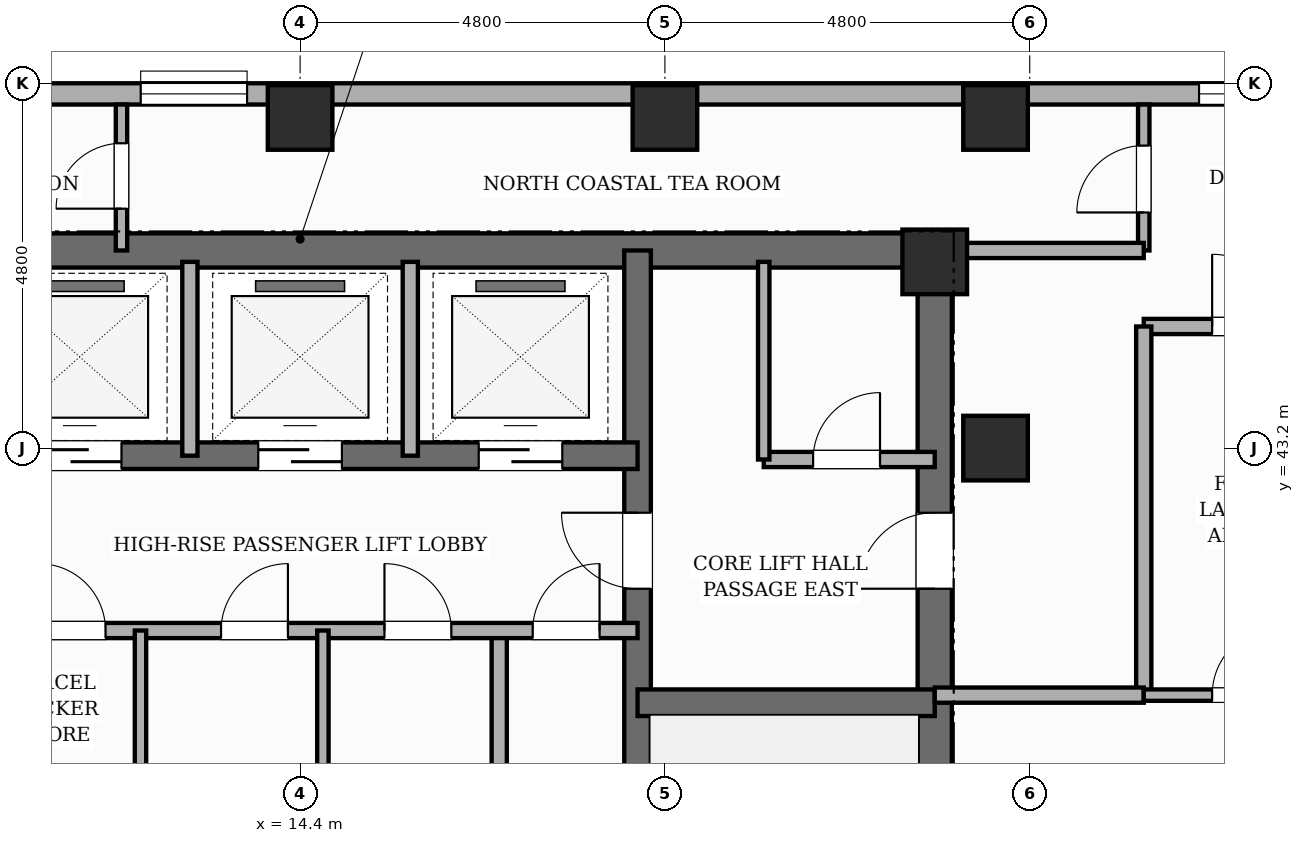
"""IFC4 building model, lengths in metres.
Left out: names, types, materials, properties, quantities, classifications, styles, units other than length and angle.
Written with IfcOpenShell. Run it as: python <this file> out.ifc"""

import sys

from ifc_helpers import new_model, si_unit, direction, frame, frame_2d, origin, origin_2d, place, context, subcontext, project, spatial, rectangle, extrude, element, fill, save


model = new_model("IFC4")
c1 = context("Model", 3, precision=1e-05, world=origin(), true_north=direction((0.0, 1.0)))
c2 = subcontext(c1, "Body", "Model", "MODEL_VIEW")
j1 = project(units=[si_unit("LENGTHUNIT", "METRE"), si_unit("PLANEANGLEUNIT", "RADIAN")], contexts=[c1])
p1 = place(None, origin())
s1 = spatial("IfcSite", under=j1, at=p1, CompositionType="ELEMENT")
p2 = place(p1, origin())
s2 = spatial("IfcBuilding", under=s1, at=p2, CompositionType="ELEMENT")
p3 = place(p2, frame((0.0, 0.0, 236.2)))
s3 = spatial("IfcBuildingStorey", under=s2, at=p3, CompositionType="ELEMENT", Elevation=236.2)
p4 = place(p3, frame((22.75, 30.675, 0.0), z_axis=(0.0, 0.0, 1.0), x_axis=(0.0, 1.0, 0.0)))
e1 = element("IfcWall", 1, at=p4, inside=s3, PredefinedType="SHEAR", context=c2, shape_type="SweptSolid", body=[
    extrude(rectangle(XDim=15.35, YDim=0.45, at=frame_2d((7.675, 0.0))), origin(), (0.0, 0.0, 1.0), 3.6),
])
p5 = place(p4, frame((10.675, 0.0, 0.0)))
e2 = element("IfcOpeningElement", 2, at=p5, cuts=e1, PredefinedType="OPENING", context=c2, shape_type="SweptSolid", body=[
    extrude(rectangle(XDim=1.0, YDim=2.15, at=frame_2d((0.5, 1.075))), frame((0.0, 0.235, 0.0), z_axis=(0.0, -1.0, 0.0), x_axis=(1.0, 0.0, 0.0)), (0.0, 0.0, 1.0), 0.47),
])
p6 = place(p3, frame((6.05, 45.8, 0.0), z_axis=(0.0, 0.0, 1.0), x_axis=(1.0, 0.0, 0.0)))
e3 = element("IfcWall", 3, at=p6, inside=s3, PredefinedType="SHEAR", context=c2, shape_type="SweptSolid", body=[
    extrude(rectangle(XDim=16.7, YDim=0.45, at=frame_2d((8.35, 0.0))), origin(), (0.0, 0.0, 1.0), 3.6),
])
p7 = place(p3, frame((18.84, 30.9, 0.0), z_axis=(0.0, 0.0, 1.0), x_axis=(0.0, 1.0, 0.0)))
e4 = element("IfcWall", 4, at=p7, inside=s3, PredefinedType="SHEAR", context=c2, shape_type="SweptSolid", body=[
    extrude(rectangle(XDim=14.9, YDim=0.35, at=frame_2d((7.45, 0.0))), origin(), (0.0, 0.0, 1.0), 3.6),
])
p8 = place(p7, frame((0.65, 0.0, 0.0)))
e5 = element("IfcOpeningElement", 5, at=p8, cuts=e4, PredefinedType="OPENING", context=c2, shape_type="SweptSolid", body=[
    extrude(rectangle(XDim=0.95, YDim=2.1, at=frame_2d((0.475, 1.05))), frame((0.0, 0.185, 0.0), z_axis=(0.0, -1.0, 0.0), x_axis=(1.0, 0.0, 0.0)), (0.0, 0.0, 1.0), 0.37),
])
p9 = place(p7, frame((10.45, 0.0, 0.0)))
e6 = element("IfcOpeningElement", 6, at=p9, cuts=e4, PredefinedType="OPENING", context=c2, shape_type="SweptSolid", body=[
    extrude(rectangle(XDim=1.0, YDim=2.15, at=frame_2d((0.5, 1.075))), frame((0.0, 0.185, 0.0), z_axis=(0.0, -1.0, 0.0), x_axis=(1.0, 0.0, 0.0)), (0.0, 0.0, 1.0), 0.37),
])
p10 = place(p3, frame((18.84, 39.85, 0.0), z_axis=(0.0, 0.0, 1.0), x_axis=(1.0, 0.0, 0.0)))
e7 = element("IfcWall", 7, at=p10, inside=s3, PredefinedType="SHEAR", context=c2, shape_type="SweptSolid", body=[
    extrude(rectangle(XDim=3.91, YDim=0.35, at=frame_2d((1.955, 0.0))), origin(), (0.0, 0.0, 1.0), 3.6),
])
p11 = place(p3, frame((9.96, 43.1, 0.0), z_axis=(0.0, 0.0, 1.0), x_axis=(1.0, 0.0, 0.0)))
e8 = element("IfcWall", 8, at=p11, inside=s3, PredefinedType="SHEAR", context=c2, shape_type="SweptSolid", body=[
    extrude(rectangle(XDim=8.88, YDim=0.35, at=frame_2d((4.44, 0.0))), origin(), (0.0, 0.0, 1.0), 3.6),
])
p12 = place(p11, frame((0.99, 0.0, 0.0)))
e9 = element("IfcOpeningElement", 9, at=p12, cuts=e8, PredefinedType="OPENING", context=c2, shape_type="SweptSolid", body=[
    extrude(rectangle(XDim=1.1, YDim=2.15, at=frame_2d((0.55, 1.075))), frame((0.0, 0.185, 0.0), z_axis=(0.0, -1.0, 0.0), x_axis=(1.0, 0.0, 0.0)), (0.0, 0.0, 1.0), 0.37),
])
p13 = place(p11, frame((3.89, 0.0, 0.0)))
e10 = element("IfcOpeningElement", 10, at=p13, cuts=e8, PredefinedType="OPENING", context=c2, shape_type="SweptSolid", body=[
    extrude(rectangle(XDim=1.1, YDim=2.15, at=frame_2d((0.55, 1.075))), frame((0.0, 0.185, 0.0), z_axis=(0.0, -1.0, 0.0), x_axis=(1.0, 0.0, 0.0)), (0.0, 0.0, 1.0), 0.37),
])
p14 = place(p11, frame((6.79, 0.0, 0.0)))
e11 = element("IfcOpeningElement", 11, at=p14, cuts=e8, PredefinedType="OPENING", context=c2, shape_type="SweptSolid", body=[
    extrude(rectangle(XDim=1.1, YDim=2.15, at=frame_2d((0.55, 1.075))), frame((0.0, 0.185, 0.0), z_axis=(0.0, -1.0, 0.0), x_axis=(1.0, 0.0, 0.0)), (0.0, 0.0, 1.0), 0.37),
])
for number, where, z_axis, x_axis in (
    (12, (14.4, 47.55, 0.0), (0.0, 0.0, 1.0), (1.0, 0.0, 0.0)),
    (13, (19.2, 47.55, 0.0), (0.0, 0.0, 1.0), (1.0, 0.0, 0.0)),
    (14, (22.75, 45.65, 0.0), (0.0, 0.0, 1.0), (1.0, 0.0, 0.0)),
    (15, (23.55, 43.2, 0.0), (0.0, 0.0, 1.0), (1.0, 0.0, 0.0)),
    (16, (23.55, 47.55, 0.0), (0.0, 0.0, 1.0), (1.0, 0.0, 0.0)),
):
    element("IfcColumn", number, at=place(p3, frame(where, z_axis=z_axis, x_axis=x_axis)), inside=s3, PredefinedType="COLUMN", context=c2, shape_type="SweptSolid", body=[
        extrude(rectangle(XDim=0.85, YDim=0.85, at=origin_2d()), origin(), (0.0, 0.0, 1.0), 3.6),
    ])
p15 = place(p3, frame((7.2, 47.86, 0.0), z_axis=(0.0, 0.0, 1.0), x_axis=(1.0, 0.0, 0.0)))
e17 = element("IfcWall", 17, at=p15, inside=s3, PredefinedType="STANDARD", context=c2, shape_type="SweptSolid", body=[
    extrude(rectangle(XDim=43.2, YDim=0.28, at=frame_2d((21.6, 0.0))), origin(), (0.0, 0.0, 1.0), 2.6),
])
p16 = place(p15, frame((19.028, 0.0, 0.65)))
e18 = element("IfcOpeningElement", 18, at=p16, cuts=e17, PredefinedType="OPENING", context=c2, shape_type="SweptSolid", body=[
    extrude(rectangle(XDim=1.4, YDim=1.1, at=frame_2d((0.7, 0.55))), frame((0.0, 0.15, 0.0), z_axis=(0.0, -1.0, 0.0), x_axis=(1.0, 0.0, 0.0)), (0.0, 0.0, 1.0), 0.3),
])
p17 = place(p15, frame((0.308, 0.0, 0.65)))
e19 = element("IfcOpeningElement", 19, at=p17, cuts=e17, PredefinedType="OPENING", context=c2, shape_type="SweptSolid", body=[
    extrude(rectangle(XDim=1.4, YDim=1.1, at=frame_2d((0.7, 0.55))), frame((0.0, 0.15, 0.0), z_axis=(0.0, -1.0, 0.0), x_axis=(1.0, 0.0, 0.0)), (0.0, 0.0, 1.0), 0.3),
])
p18 = place(p15, frame((5.103, 0.0, 0.65)))
e20 = element("IfcOpeningElement", 20, at=p18, cuts=e17, PredefinedType="OPENING", context=c2, shape_type="SweptSolid", body=[
    extrude(rectangle(XDim=1.4, YDim=1.1, at=frame_2d((0.7, 0.55))), frame((0.0, 0.15, 0.0), z_axis=(0.0, -1.0, 0.0), x_axis=(1.0, 0.0, 0.0)), (0.0, 0.0, 1.0), 0.3),
])
p19 = place(p3, frame((17.02, 35.65, 0.0), z_axis=(0.0, 0.0, 1.0), x_axis=(0.0, 1.0, 0.0)))
e21 = element("IfcWall", 21, at=p19, inside=s3, PredefinedType="POLYGONAL", context=c2, shape_type="SweptSolid", body=[
    extrude(rectangle(XDim=5.15, YDim=0.2, at=frame_2d((2.575, 0.0))), origin(), (0.0, 0.0, 1.0), 3.32),
])
p20 = place(p3, frame((9.96, 40.8, 0.0), z_axis=(0.0, 0.0, 1.0), x_axis=(1.0, 0.0, 0.0)))
e22 = element("IfcWall", 22, at=p20, inside=s3, PredefinedType="POLYGONAL", context=c2, shape_type="SweptSolid", body=[
    extrude(rectangle(XDim=8.88, YDim=0.2, at=frame_2d((4.44, 0.0))), origin(), (0.0, 0.0, 1.0), 3.32),
])
p21 = place(p20, frame((7.5, 0.0, 0.0)))
e23 = element("IfcOpeningElement", 23, at=p21, cuts=e22, PredefinedType="OPENING", context=c2, shape_type="SweptSolid", body=[
    extrude(rectangle(XDim=0.88, YDim=2.1, at=frame_2d((0.44, 1.05))), frame((0.0, 0.11, 0.0), z_axis=(0.0, -1.0, 0.0), x_axis=(1.0, 0.0, 0.0)), (0.0, 0.0, 1.0), 0.22),
])
p22 = place(p20, frame((1.0, 0.0, 0.0)))
e24 = element("IfcOpeningElement", 24, at=p22, cuts=e22, PredefinedType="OPENING", context=c2, shape_type="SweptSolid", body=[
    extrude(rectangle(XDim=0.88, YDim=2.1, at=frame_2d((0.44, 1.05))), frame((0.0, 0.11, 0.0), z_axis=(0.0, -1.0, 0.0), x_axis=(1.0, 0.0, 0.0)), (0.0, 0.0, 1.0), 0.22),
])
p23 = place(p20, frame((3.4, 0.0, 0.0)))
e25 = element("IfcOpeningElement", 25, at=p23, cuts=e22, PredefinedType="OPENING", context=c2, shape_type="SweptSolid", body=[
    extrude(rectangle(XDim=0.88, YDim=2.1, at=frame_2d((0.44, 1.05))), frame((0.0, 0.11, 0.0), z_axis=(0.0, -1.0, 0.0), x_axis=(1.0, 0.0, 0.0)), (0.0, 0.0, 1.0), 0.22),
])
p24 = place(p20, frame((5.55, 0.0, 0.0)))
e26 = element("IfcOpeningElement", 26, at=p24, cuts=e22, PredefinedType="OPENING", context=c2, shape_type="SweptSolid", body=[
    extrude(rectangle(XDim=0.88, YDim=2.1, at=frame_2d((0.44, 1.05))), frame((0.0, 0.11, 0.0), z_axis=(0.0, -1.0, 0.0), x_axis=(1.0, 0.0, 0.0)), (0.0, 0.0, 1.0), 0.22),
])
p25 = place(p3, frame((20.5, 43.05, 0.0), z_axis=(0.0, 0.0, 1.0), x_axis=(1.0, 0.0, 0.0)))
e27 = element("IfcWall", 27, at=p25, inside=s3, PredefinedType="POLYGONAL", context=c2, shape_type="SweptSolid", body=[
    extrude(rectangle(XDim=2.25, YDim=0.2, at=frame_2d((1.125, 0.0))), origin(), (0.0, 0.0, 1.0), 2.6),
])
p26 = place(p25, frame((0.65, 0.0, 0.0)))
e28 = element("IfcOpeningElement", 28, at=p26, cuts=e27, PredefinedType="OPENING", context=c2, shape_type="SweptSolid", body=[
    extrude(rectangle(XDim=0.88, YDim=2.1, at=frame_2d((0.44, 1.05))), frame((0.0, 0.11, 0.0), z_axis=(0.0, -1.0, 0.0), x_axis=(1.0, 0.0, 0.0)), (0.0, 0.0, 1.0), 0.22),
])
for number, where, z_axis, x_axis in (
    (29, (12.95, 43.1, 0.0), (0.0, 0.0, 1.0), (0.0, 1.0, 0.0)),
    (30, (15.85, 43.1, 0.0), (0.0, 0.0, 1.0), (0.0, 1.0, 0.0)),
):
    element("IfcWall", number, at=place(p3, frame(where, z_axis=z_axis, x_axis=x_axis)), inside=s3, PredefinedType="POLYGONAL", context=c2, shape_type="SweptSolid", body=[
        extrude(rectangle(XDim=2.55, YDim=0.2, at=frame_2d((1.275, 0.0))), origin(), (0.0, 0.0, 1.0), 3.32),
    ])
for number, where, z_axis, x_axis in (
    (31, (12.3, 38.72, 0.0), (0.0, 0.0, 1.0), (0.0, 1.0, 0.0)),
    (32, (14.7, 38.72, 0.0), (0.0, 0.0, 1.0), (0.0, 1.0, 0.0)),
):
    element("IfcWall", number, at=place(p3, frame(where, z_axis=z_axis, x_axis=x_axis)), inside=s3, PredefinedType="PARTITIONING", context=c2, shape_type="SweptSolid", body=[
        extrude(rectangle(XDim=2.08, YDim=0.15, at=frame_2d((1.04, 0.0))), origin(), (0.0, 0.0, 1.0), 3.32),
    ])
p27 = place(p3, frame((20.5, 43.05, 0.0), z_axis=(0.0, 0.0, 1.0), x_axis=(0.0, 1.0, 0.0)))
e33 = element("IfcWall", 33, at=p27, inside=s3, PredefinedType="PARTITIONING", context=c2, shape_type="SweptSolid", body=[
    extrude(rectangle(XDim=2.6, YDim=0.15, at=frame_2d((1.3, 0.0))), origin(), (0.0, 0.0, 1.0), 3.32),
])
p28 = place(p3, frame((25.5, 45.8, 0.0), z_axis=(0.0, 0.0, 1.0), x_axis=(0.0, 1.0, 0.0)))
e34 = element("IfcWall", 34, at=p28, inside=s3, PredefinedType="PARTITIONING", context=c2, shape_type="SweptSolid", body=[
    extrude(rectangle(XDim=1.92, YDim=0.15, at=frame_2d((0.96, 0.0))), origin(), (0.0, 0.0, 1.0), 3.32),
])
p29 = place(p28, frame((0.5, 0.0, 0.0)))
e35 = element("IfcOpeningElement", 35, at=p29, cuts=e34, PredefinedType="OPENING", context=c2, shape_type="SweptSolid", body=[
    extrude(rectangle(XDim=0.88, YDim=2.1, at=frame_2d((0.44, 1.05))), frame((0.0, 0.085, 0.0), z_axis=(0.0, -1.0, 0.0), x_axis=(1.0, 0.0, 0.0)), (0.0, 0.0, 1.0), 0.17),
])
p30 = place(p3, frame((22.75, 45.8, 0.0), z_axis=(0.0, 0.0, 1.0), x_axis=(1.0, 0.0, 0.0)))
e36 = element("IfcWall", 36, at=p30, inside=s3, PredefinedType="PARTITIONING", context=c2, shape_type="SweptSolid", body=[
    extrude(rectangle(XDim=2.75, YDim=0.2, at=frame_2d((1.375, 0.0))), origin(), (0.0, 0.0, 1.0), 3.32),
])
p31 = place(p3, frame((12.05, 45.8, 0.0), z_axis=(0.0, 0.0, 1.0), x_axis=(0.0, 1.0, 0.0)))
e37 = element("IfcWall", 37, at=p31, inside=s3, PredefinedType="PARTITIONING", context=c2, shape_type="SweptSolid", body=[
    extrude(rectangle(XDim=1.92, YDim=0.15, at=frame_2d((0.96, 0.0))), origin(), (0.0, 0.0, 1.0), 3.32),
])
p32 = place(p31, frame((0.55, 0.0, 0.0)))
e38 = element("IfcOpeningElement", 38, at=p32, cuts=e37, PredefinedType="OPENING", context=c2, shape_type="SweptSolid", body=[
    extrude(rectangle(XDim=0.86, YDim=2.1, at=frame_2d((0.43, 1.05))), frame((0.0, 0.085, 0.0), z_axis=(0.0, -1.0, 0.0), x_axis=(1.0, 0.0, 0.0)), (0.0, 0.0, 1.0), 0.17),
])
p33 = place(p3, frame((25.5, 44.8, 0.0), z_axis=(0.0, 0.0, 1.0), x_axis=(1.0, 0.0, 0.0)))
e39 = element("IfcWall", 39, at=p33, inside=s3, PredefinedType="PARTITIONING", context=c2, shape_type="SweptSolid", body=[
    extrude(rectangle(XDim=16.28, YDim=0.2, at=frame_2d((8.14, 0.0))), origin(), (0.0, 0.0, 1.0), 3.32),
])
p34 = place(p33, frame((0.9, 0.0, 0.0)))
e40 = element("IfcOpeningElement", 40, at=p34, cuts=e39, PredefinedType="OPENING", context=c2, shape_type="SweptSolid", body=[
    extrude(rectangle(XDim=0.95, YDim=2.15, at=frame_2d((0.475, 1.075))), frame((0.0, 0.11, 0.0), z_axis=(0.0, -1.0, 0.0), x_axis=(1.0, 0.0, 0.0)), (0.0, 0.0, 1.0), 0.22),
])
p35 = place(p33, frame((6.014, 0.0, 0.0)))
e41 = element("IfcOpeningElement", 41, at=p35, cuts=e39, PredefinedType="OPENING", context=c2, shape_type="SweptSolid", body=[
    extrude(rectangle(XDim=0.98, YDim=2.18, at=frame_2d((0.49, 1.09))), frame((0.0, 0.11, 0.0), z_axis=(0.0, -1.0, 0.0), x_axis=(1.0, 0.0, 0.0)), (0.0, 0.0, 1.0), 0.22),
])
p36 = place(p3, frame((25.5, 39.95, 0.0), z_axis=(0.0, 0.0, 1.0), x_axis=(0.0, 1.0, 0.0)))
e42 = element("IfcWall", 42, at=p36, inside=s3, PredefinedType="PARTITIONING", context=c2, shape_type="SweptSolid", body=[
    extrude(rectangle(XDim=4.85, YDim=0.2, at=frame_2d((2.425, 0.0))), origin(), (0.0, 0.0, 1.0), 3.32),
])
p37 = place(p3, frame((22.75, 39.95, 0.0), z_axis=(0.0, 0.0, 1.0), x_axis=(1.0, 0.0, 0.0)))
e43 = element("IfcWall", 43, at=p37, inside=s3, PredefinedType="PARTITIONING", context=c2, shape_type="SweptSolid", body=[
    extrude(rectangle(XDim=2.75, YDim=0.2, at=frame_2d((1.375, 0.0))), origin(), (0.0, 0.0, 1.0), 3.32),
])
p38 = place(p3, frame((25.5, 39.95, 0.0), z_axis=(0.0, 0.0, 1.0), x_axis=(1.0, 0.0, 0.0)))
e44 = element("IfcWall", 44, at=p38, inside=s3, PredefinedType="PARTITIONING", context=c2, shape_type="SweptSolid", body=[
    extrude(rectangle(XDim=2.8, YDim=0.15, at=frame_2d((1.4, 0.0))), origin(), (0.0, 0.0, 1.0), 3.32),
])
p39 = place(p38, frame((0.9, 0.0, 0.0)))
e45 = element("IfcOpeningElement", 45, at=p39, cuts=e44, PredefinedType="OPENING", context=c2, shape_type="SweptSolid", body=[
    extrude(rectangle(XDim=0.9, YDim=2.15, at=frame_2d((0.45, 1.075))), frame((0.0, 0.085, 0.0), z_axis=(0.0, -1.0, 0.0), x_axis=(1.0, 0.0, 0.0)), (0.0, 0.0, 1.0), 0.17),
])
p40 = place(p16, origin())
e46 = element("IfcWindow", 46, at=p40, inside=s3, PartitioningType="SINGLE_PANEL", PredefinedType="WINDOW", context=c2, shape_type="SweptSolid", body=[
    extrude(rectangle(XDim=1.4, YDim=1.1, at=frame_2d((0.7, 0.55))), frame((0.0, 0.03, 0.0), z_axis=(0.0, -1.0, 0.0), x_axis=(1.0, 0.0, 0.0)), (0.0, 0.0, 1.0), 0.06),
])
fill(e18, e46)
p41 = place(p18, origin())
e47 = element("IfcWindow", 47, at=p41, inside=s3, PartitioningType="SINGLE_PANEL", PredefinedType="WINDOW", context=c2, shape_type="SweptSolid", body=[
    extrude(rectangle(XDim=1.4, YDim=1.1, at=frame_2d((0.7, 0.55))), frame((0.0, 0.03, 0.0), z_axis=(0.0, -1.0, 0.0), x_axis=(1.0, 0.0, 0.0)), (0.0, 0.0, 1.0), 0.06),
])
fill(e20, e47)
p42 = place(p21, origin())
e48 = element("IfcDoor", 48, at=p42, inside=s3, OperationType="SINGLE_SWING_RIGHT", PredefinedType="DOOR", context=c2, shape_type="SweptSolid", body=[
    extrude(rectangle(XDim=0.88, YDim=2.1, at=frame_2d((0.44, 1.05))), frame((0.0, 0.025, 0.0), z_axis=(0.0, -1.0, 0.0), x_axis=(1.0, 0.0, 0.0)), (0.0, 0.0, 1.0), 0.05),
])
fill(e23, e48)
p43 = place(p12, origin())
e49 = element("IfcDoor", 49, at=p43, inside=s3, OperationType="SLIDING_TO_LEFT", PredefinedType="DOOR", context=c2, shape_type="SweptSolid", body=[
    extrude(rectangle(XDim=1.1, YDim=2.15, at=frame_2d((0.55, 1.075))), frame((0.0, 0.025, 0.0), z_axis=(0.0, -1.0, 0.0), x_axis=(1.0, 0.0, 0.0)), (0.0, 0.0, 1.0), 0.05),
])
fill(e9, e49)
p44 = place(p13, origin())
e50 = element("IfcDoor", 50, at=p44, inside=s3, OperationType="SLIDING_TO_RIGHT", PredefinedType="DOOR", context=c2, shape_type="SweptSolid", body=[
    extrude(rectangle(XDim=1.1, YDim=2.15, at=frame_2d((0.55, 1.075))), frame((0.0, 0.025, 0.0), z_axis=(0.0, -1.0, 0.0), x_axis=(1.0, 0.0, 0.0)), (0.0, 0.0, 1.0), 0.05),
])
fill(e10, e50)
p45 = place(p14, origin())
e51 = element("IfcDoor", 51, at=p45, inside=s3, OperationType="SLIDING_TO_LEFT", PredefinedType="DOOR", context=c2, shape_type="SweptSolid", body=[
    extrude(rectangle(XDim=1.1, YDim=2.15, at=frame_2d((0.55, 1.075))), frame((0.0, 0.025, 0.0), z_axis=(0.0, -1.0, 0.0), x_axis=(1.0, 0.0, 0.0)), (0.0, 0.0, 1.0), 0.05),
])
fill(e11, e51)
p46 = place(p9, origin())
e52 = element("IfcDoor", 52, at=p46, inside=s3, OperationType="SINGLE_SWING_RIGHT", PredefinedType="DOOR", context=c2, shape_type="SweptSolid", body=[
    extrude(rectangle(XDim=1.0, YDim=2.15, at=frame_2d((0.5, 1.075))), frame((0.0, 0.025, 0.0), z_axis=(0.0, -1.0, 0.0), x_axis=(1.0, 0.0, 0.0)), (0.0, 0.0, 1.0), 0.05),
])
fill(e6, e52)
p47 = place(p5, origin())
e53 = element("IfcDoor", 53, at=p47, inside=s3, OperationType="SINGLE_SWING_LEFT", PredefinedType="DOOR", context=c2, shape_type="SweptSolid", body=[
    extrude(rectangle(XDim=1.0, YDim=2.15, at=frame_2d((0.5, 1.075))), frame((0.0, 0.025, 0.0), z_axis=(0.0, -1.0, 0.0), x_axis=(1.0, 0.0, 0.0)), (0.0, 0.0, 1.0), 0.05),
])
fill(e2, e53)
p48 = place(p22, origin())
e54 = element("IfcDoor", 54, at=p48, inside=s3, OperationType="SINGLE_SWING_LEFT", PredefinedType="DOOR", context=c2, shape_type="SweptSolid", body=[
    extrude(rectangle(XDim=0.88, YDim=2.1, at=frame_2d((0.44, 1.05))), frame((0.0, 0.025, 0.0), z_axis=(0.0, -1.0, 0.0), x_axis=(1.0, 0.0, 0.0)), (0.0, 0.0, 1.0), 0.05),
])
fill(e24, e54)
p49 = place(p23, origin())
e55 = element("IfcDoor", 55, at=p49, inside=s3, OperationType="SINGLE_SWING_RIGHT", PredefinedType="DOOR", context=c2, shape_type="SweptSolid", body=[
    extrude(rectangle(XDim=0.88, YDim=2.1, at=frame_2d((0.44, 1.05))), frame((0.0, 0.025, 0.0), z_axis=(0.0, -1.0, 0.0), x_axis=(1.0, 0.0, 0.0)), (0.0, 0.0, 1.0), 0.05),
])
fill(e25, e55)
p50 = place(p24, origin())
e56 = element("IfcDoor", 56, at=p50, inside=s3, OperationType="SINGLE_SWING_LEFT", PredefinedType="DOOR", context=c2, shape_type="SweptSolid", body=[
    extrude(rectangle(XDim=0.88, YDim=2.1, at=frame_2d((0.44, 1.05))), frame((0.0, 0.025, 0.0), z_axis=(0.0, -1.0, 0.0), x_axis=(1.0, 0.0, 0.0)), (0.0, 0.0, 1.0), 0.05),
])
fill(e26, e56)
p51 = place(p26, origin())
e57 = element("IfcDoor", 57, at=p51, inside=s3, OperationType="SINGLE_SWING_RIGHT", PredefinedType="DOOR", context=c2, shape_type="SweptSolid", body=[
    extrude(rectangle(XDim=0.88, YDim=2.1, at=frame_2d((0.44, 1.05))), frame((0.0, 0.025, 0.0), z_axis=(0.0, -1.0, 0.0), x_axis=(1.0, 0.0, 0.0)), (0.0, 0.0, 1.0), 0.05),
])
fill(e28, e57)
p52 = place(p29, origin())
e58 = element("IfcDoor", 58, at=p52, inside=s3, OperationType="SINGLE_SWING_LEFT", PredefinedType="DOOR", context=c2, shape_type="SweptSolid", body=[
    extrude(rectangle(XDim=0.88, YDim=2.1, at=frame_2d((0.44, 1.05))), frame((0.0, 0.025, 0.0), z_axis=(0.0, -1.0, 0.0), x_axis=(1.0, 0.0, 0.0)), (0.0, 0.0, 1.0), 0.05),
])
fill(e35, e58)
p53 = place(p32, origin())
e59 = element("IfcDoor", 59, at=p53, inside=s3, OperationType="SINGLE_SWING_LEFT", PredefinedType="DOOR", context=c2, shape_type="SweptSolid", body=[
    extrude(rectangle(XDim=0.86, YDim=2.1, at=frame_2d((0.43, 1.05))), frame((0.0, 0.025, 0.0), z_axis=(0.0, -1.0, 0.0), x_axis=(1.0, 0.0, 0.0)), (0.0, 0.0, 1.0), 0.05),
])
fill(e38, e59)
p54 = place(p34, origin())
e60 = element("IfcDoor", 60, at=p54, inside=s3, OperationType="SINGLE_SWING_LEFT", PredefinedType="DOOR", context=c2, shape_type="SweptSolid", body=[
    extrude(rectangle(XDim=0.95, YDim=2.15, at=frame_2d((0.475, 1.075))), frame((0.0, 0.025, 0.0), z_axis=(0.0, -1.0, 0.0), x_axis=(1.0, 0.0, 0.0)), (0.0, 0.0, 1.0), 0.05),
])
fill(e40, e60)
p55 = place(p39, origin())
e61 = element("IfcDoor", 61, at=p55, inside=s3, OperationType="SINGLE_SWING_RIGHT", PredefinedType="DOOR", context=c2, shape_type="SweptSolid", body=[
    extrude(rectangle(XDim=0.9, YDim=2.15, at=frame_2d((0.45, 1.075))), frame((0.0, 0.025, 0.0), z_axis=(0.0, -1.0, 0.0), x_axis=(1.0, 0.0, 0.0)), (0.0, 0.0, 1.0), 0.05),
])
fill(e45, e61)
save(model, sys.argv[1])
